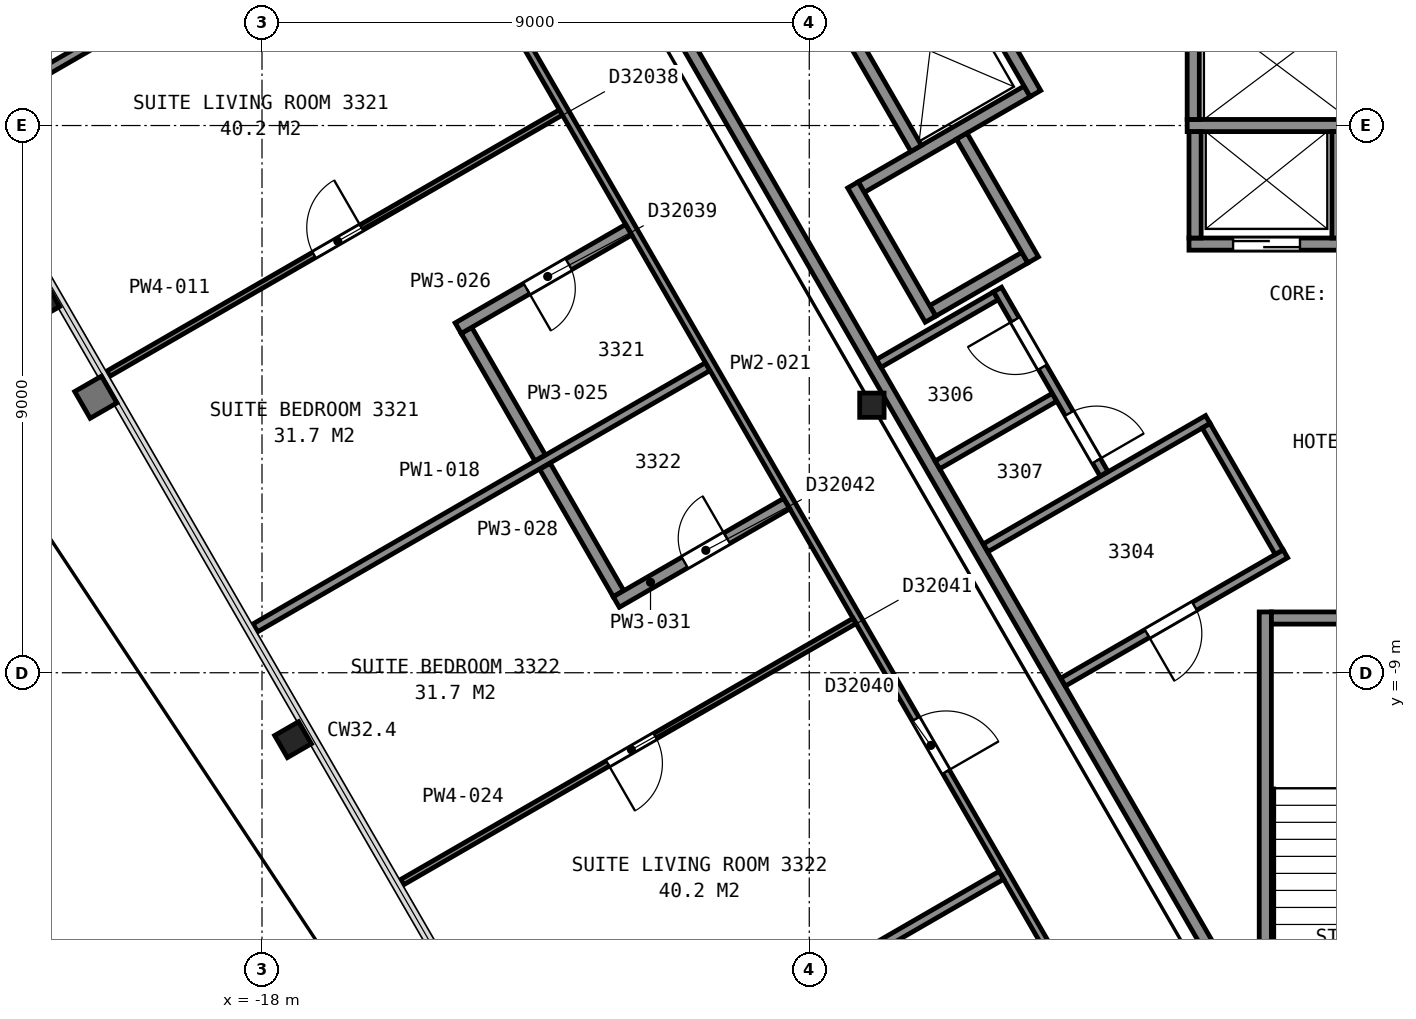
"""IFC4 building model, lengths in metres.
Left out: names, types, materials, properties, quantities, classifications, styles, units other than length and angle.
Written with IfcOpenShell. Run it as: python <this file> out.ifc"""

import sys

from ifc_helpers import new_model, si_unit, direction, frame, frame_2d, origin, origin_2d, place, context, subcontext, project, spatial, rectangle, i_section, extrude, element, fill, save


model = new_model("IFC4")
c1 = context("Model", 3, precision=1e-05, world=origin(), true_north=direction((0.0, 1.0)))
c2 = subcontext(c1, "Body", "Model", "MODEL_VIEW")
j1 = project(units=[si_unit("LENGTHUNIT", "METRE"), si_unit("PLANEANGLEUNIT", "RADIAN")], contexts=[c1])
p1 = place(None, origin())
s1 = spatial("IfcSite", under=j1, at=p1, CompositionType="ELEMENT")
p2 = place(p1, origin())
s2 = spatial("IfcBuilding", under=s1, at=p2, CompositionType="ELEMENT")
p3 = place(p2, frame((0.0, 0.0, 136.0)))
s3 = spatial("IfcBuildingStorey", under=s2, at=p3, CompositionType="ELEMENT", Elevation=136.0)
for number, where, z_axis, x_axis in (
    (1, (-21.63, -2.91, 0.0), (0.0, 0.0, 1.0), (-0.5, 0.866, 0.0)),
    (2, (-17.49, -10.1, 0.0), (0.0, 0.0, 1.0), (-0.5, 0.866, 0.0)),
):
    element("IfcColumn", number, at=place(p3, frame(where, z_axis=z_axis, x_axis=x_axis)), inside=s3, PredefinedType="COLUMN", context=c2, shape_type="SweptSolid", body=[
        extrude(i_section(OverallWidth=0.419, OverallDepth=0.455, WebThickness=0.042, FlangeThickness=0.068, FilletRadius=0.015, at=origin_2d()), origin(), (0.0, 0.0, 1.0), 3.6),
    ])
p4 = place(p3, frame((-7.97, -4.6, 0.0), z_axis=(0.0, 0.0, 1.0), x_axis=(1.0, 0.0, 0.0)))
e3 = element("IfcColumn", 3, at=p4, inside=s3, PredefinedType="COLUMN", context=c2, shape_type="SweptSolid", body=[
    extrude(i_section(OverallWidth=0.401, OverallDepth=0.399, WebThickness=0.025, FlangeThickness=0.04, FilletRadius=0.015, at=origin_2d()), origin(), (0.0, 0.0, 1.0), 3.6),
])
p5 = place(p3, frame((-1.5, -8.0, 0.0), z_axis=(0.0, 0.0, 1.0), x_axis=(0.0, -1.0, 0.0)))
e4 = element("IfcWall", 4, at=p5, inside=s3, PredefinedType="PARTITIONING", context=c2, shape_type="SweptSolid", body=[
    extrude(rectangle(XDim=12.0, YDim=0.2, at=frame_2d((6.0, 0.0))), origin(), (0.0, 0.0, 1.0), 3.35),
])
p6 = place(p3, frame((-1.4, -8.1, 0.0), z_axis=(0.0, 0.0, 1.0), x_axis=(1.0, 0.0, 0.0)))
e5 = element("IfcWall", 5, at=p6, inside=s3, PredefinedType="PARTITIONING", context=c2, shape_type="SweptSolid", body=[
    extrude(rectangle(XDim=2.8, YDim=0.2, at=frame_2d((1.4, 0.0))), origin(), (0.0, 0.0, 1.0), 3.35),
])
p7 = place(p3, frame((-2.755, -1.95, 0.0), z_axis=(0.0, 0.0, 1.0), x_axis=(1.0, 0.0, 0.0)))
e6 = element("IfcWall", 6, at=p7, inside=s3, PredefinedType="PARTITIONING", context=c2, shape_type="SweptSolid", body=[
    extrude(rectangle(XDim=2.55, YDim=0.2, at=frame_2d((1.275, 0.0))), origin(), (0.0, 0.0, 1.0), 3.6),
])
p8 = place(p7, frame((0.725, 0.0, 0.0)))
e7 = element("IfcOpeningElement", 7, at=p8, cuts=e6, PredefinedType="OPENING", context=c2, shape_type="SweptSolid", body=[
    extrude(rectangle(XDim=1.1, YDim=2.1, at=frame_2d((0.55, 1.05))), frame((0.0, 0.11, 0.0), z_axis=(0.0, -1.0, 0.0), x_axis=(1.0, 0.0, 0.0)), (0.0, 0.0, 1.0), 0.22),
])
p9 = place(p3, frame((-2.785, 0.0, 0.0), z_axis=(0.0, 0.0, 1.0), x_axis=(1.0, 0.0, 0.0)))
e8 = element("IfcWall", 8, at=p9, inside=s3, PredefinedType="PARTITIONING", context=c2, shape_type="SweptSolid", body=[
    extrude(rectangle(XDim=2.95, YDim=0.2, at=frame_2d((1.475, 0.0))), origin(), (0.0, 0.0, 1.0), 3.6),
])
p10 = place(p3, frame((-6.97, -3.048, 0.0), z_axis=(0.0, 0.0, 1.0), x_axis=(0.866036909293, 0.499980071345, 0.0)))
e9 = element("IfcWall", 9, at=p10, inside=s3, PredefinedType="PARTITIONING", context=c2, shape_type="SweptSolid", body=[
    extrude(rectangle(XDim=1.75, YDim=0.2, at=frame_2d((0.875, 0.0))), origin(), (0.0, 0.0, 1.0), 3.6),
])
p11 = place(p3, frame((-8.145, -1.013, 0.0), z_axis=(0.0, 0.0, 1.0), x_axis=(0.866016494683, 0.500015430699, 0.0)))
e10 = element("IfcWall", 10, at=p11, inside=s3, PredefinedType="PARTITIONING", context=c2, shape_type="SweptSolid", body=[
    extrude(rectangle(XDim=3.15, YDim=0.2, at=frame_2d((1.575, 0.0))), origin(), (0.0, 0.0, 1.0), 3.6),
])
for number, where, z_axis, x_axis in (
    (11, (-0.305, -1.85, 0.0), (0.0, 0.0, 1.0), (0.0, 1.0, 0.0)),
    (12, (-2.655, -1.85, 0.0), (0.0, 0.0, 1.0), (0.0, 1.0, 0.0)),
):
    element("IfcWall", number, at=place(p3, frame(where, z_axis=z_axis, x_axis=x_axis)), inside=s3, PredefinedType="PARTITIONING", context=c2, shape_type="SweptSolid", body=[
        extrude(rectangle(XDim=1.75, YDim=0.2, at=frame_2d((0.875, 0.0))), origin(), (0.0, 0.0, 1.0), 3.6),
    ])
p12 = place(p3, frame((-2.685, 0.1, 0.0), z_axis=(0.0, 0.0, 1.0), x_axis=(0.0, 1.0, 0.0)))
e13 = element("IfcWall", 13, at=p12, inside=s3, PredefinedType="PARTITIONING", context=c2, shape_type="SweptSolid", body=[
    extrude(rectangle(XDim=1.95, YDim=0.2, at=frame_2d((0.975, 0.0))), origin(), (0.0, 0.0, 1.0), 3.6),
])
p13 = place(p3, frame((-5.28, 0.525, 0.0), z_axis=(0.0, 0.0, 1.0), x_axis=(-0.500037662692, 0.866003658127, 0.0)))
e14 = element("IfcWall", 14, at=p13, inside=s3, PredefinedType="PARTITIONING", context=c2, shape_type="SweptSolid", body=[
    extrude(rectangle(XDim=2.95, YDim=0.2, at=frame_2d((1.475, 0.0))), origin(), (0.0, 0.0, 1.0), 3.6),
])
p14 = place(p13, frame((0.925, 0.0, 0.0)))
e15 = element("IfcOpeningElement", 15, at=p14, cuts=e14, PredefinedType="OPENING", context=c2, shape_type="SweptSolid", body=[
    extrude(rectangle(XDim=1.1, YDim=2.1, at=frame_2d((0.55, 1.05))), frame((0.0, 0.11, 0.0), z_axis=(0.0, -1.0, 0.0), x_axis=(1.0, 0.0, 0.0)), (0.0, 0.0, 1.0), 0.22),
])
p15 = place(p3, frame((-5.318, -2.21, 0.0), z_axis=(0.0, 0.0, 1.0), x_axis=(-0.499938297808, 0.866061024631, 0.0)))
e16 = element("IfcWall", 16, at=p15, inside=s3, PredefinedType="PARTITIONING", context=c2, shape_type="SweptSolid", body=[
    extrude(rectangle(XDim=2.35, YDim=0.2, at=frame_2d((1.175, 0.0))), origin(), (0.0, 0.0, 1.0), 3.6),
])
p16 = place(p3, frame((-7.242, -0.376, 0.0), z_axis=(0.0, 0.0, 1.0), x_axis=(-0.499996545922, 0.866027397988, 0.0)))
e17 = element("IfcWall", 17, at=p16, inside=s3, PredefinedType="PARTITIONING", context=c2, shape_type="SweptSolid", body=[
    extrude(rectangle(XDim=2.75, YDim=0.2, at=frame_2d((1.375, 0.0))), origin(), (0.0, 0.0, 1.0), 3.6),
])
p17 = place(p3, frame((-7.006, -3.185, 0.0), z_axis=(0.0, 0.0, 1.0), x_axis=(-0.499990435942, 0.866030925526, 0.0)))
e18 = element("IfcWall", 18, at=p17, inside=s3, PredefinedType="PARTITIONING", context=c2, shape_type="SweptSolid", body=[
    extrude(rectangle(XDim=2.55, YDim=0.2, at=frame_2d((1.275, 0.0))), origin(), (0.0, 0.0, 1.0), 3.6),
])
p18 = place(p3, frame((-13.664, 5.946, 0.0), z_axis=(0.0, 0.0, 1.0), x_axis=(0.499994327219, -0.866028678941, 0.0)))
e19 = element("IfcWall", 19, at=p18, inside=s3, PredefinedType="PARTITIONING", context=c2, shape_type="SweptSolid", body=[
    extrude(rectangle(XDim=23.968, YDim=0.2, at=frame_2d((11.984, 0.0))), origin(), (0.0, 0.0, 1.0), 3.35),
])
p19 = place(p3, frame((-7.856, -3.912, 0.0), z_axis=(0.0, 0.0, 1.0), x_axis=(0.865971748, 0.500092923031, 0.0)))
e20 = element("IfcWall", 20, at=p19, inside=s3, PredefinedType="PARTITIONING", context=c2, shape_type="SweptSolid", body=[
    extrude(rectangle(XDim=2.225, YDim=0.15, at=frame_2d((1.112, 0.0))), origin(), (0.0, 0.0, 1.0), 3.35),
])
p20 = place(p3, frame((-6.892, -5.582, 0.0), z_axis=(0.0, 0.0, 1.0), x_axis=(0.865944298464, 0.500140452231, 0.0)))
e21 = element("IfcWall", 21, at=p20, inside=s3, PredefinedType="PARTITIONING", context=c2, shape_type="SweptSolid", body=[
    extrude(rectangle(XDim=2.224, YDim=0.15, at=frame_2d((1.112, 0.0))), origin(), (0.0, 0.0, 1.0), 3.35),
])
p21 = place(p3, frame((-6.1, -6.946, 0.0), z_axis=(0.0, 0.0, 1.0), x_axis=(0.866038200431, 0.499977834903, 0.0)))
e22 = element("IfcWall", 22, at=p21, inside=s3, PredefinedType="PARTITIONING", context=c2, shape_type="SweptSolid", body=[
    extrude(rectangle(XDim=4.22, YDim=0.15, at=frame_2d((2.11, 0.0))), origin(), (0.0, 0.0, 1.0), 3.35),
])
p22 = place(p3, frame((-4.152, -5.729, 0.0), z_axis=(0.0, 0.0, 1.0), x_axis=(-0.500024287448, 0.866011380966, 0.0)))
e23 = element("IfcWall", 23, at=p22, inside=s3, PredefinedType="PARTITIONING", context=c2, shape_type="SweptSolid", body=[
    extrude(rectangle(XDim=3.501, YDim=0.15, at=frame_2d((1.75, 0.0))), origin(), (0.0, 0.0, 1.0), 3.35),
])
p23 = place(p22, frame((2.026, 0.0, 0.0)))
e24 = element("IfcOpeningElement", 24, at=p23, cuts=e23, PredefinedType="OPENING", context=c2, shape_type="SweptSolid", body=[
    extrude(rectangle(XDim=0.9, YDim=2.1, at=frame_2d((0.45, 1.05))), frame((0.0, 0.085, 0.0), z_axis=(0.0, -1.0, 0.0), x_axis=(1.0, 0.0, 0.0)), (0.0, 0.0, 1.0), 0.17),
])
p24 = place(p22, frame((0.248, 0.0, 0.0)))
e25 = element("IfcOpeningElement", 25, at=p24, cuts=e23, PredefinedType="OPENING", context=c2, shape_type="SweptSolid", body=[
    extrude(rectangle(XDim=0.9, YDim=2.1, at=frame_2d((0.45, 1.05))), frame((0.0, 0.085, 0.0), z_axis=(0.0, -1.0, 0.0), x_axis=(1.0, 0.0, 0.0)), (0.0, 0.0, 1.0), 0.17),
])
p25 = place(p3, frame((-4.825, -9.154, 0.0), z_axis=(0.0, 0.0, 1.0), x_axis=(0.866023738697, 0.500002884005, 0.0)))
e26 = element("IfcWall", 26, at=p25, inside=s3, PredefinedType="PARTITIONING", context=c2, shape_type="SweptSolid", body=[
    extrude(rectangle(XDim=4.22, YDim=0.15, at=frame_2d((2.11, 0.0))), origin(), (0.0, 0.0, 1.0), 3.35),
])
p26 = place(p25, frame((1.595, 0.0, 0.0)))
e27 = element("IfcOpeningElement", 27, at=p26, cuts=e26, PredefinedType="OPENING", context=c2, shape_type="SweptSolid", body=[
    extrude(rectangle(XDim=0.9, YDim=2.1, at=frame_2d((0.45, 1.05))), frame((0.0, 0.085, 0.0), z_axis=(0.0, -1.0, 0.0), x_axis=(1.0, 0.0, 0.0)), (0.0, 0.0, 1.0), 0.17),
])
p27 = place(p3, frame((-2.472, -4.938, 0.0), z_axis=(0.0, 0.0, 1.0), x_axis=(0.500045362686, -0.865999212041, 0.0)))
e28 = element("IfcWall", 28, at=p27, inside=s3, PredefinedType="PARTITIONING", context=c2, shape_type="SweptSolid", body=[
    extrude(rectangle(XDim=2.4, YDim=0.15, at=frame_2d((1.2, 0.0))), origin(), (0.0, 0.0, 1.0), 3.35),
])
p28 = place(p3, frame((-22.939, 0.102, 0.0), z_axis=(0.0, 0.0, 1.0), x_axis=(0.866041729639, 0.499971721724, 0.0)))
e29 = element("IfcWall", 29, at=p28, inside=s3, PredefinedType="PARTITIONING", context=c2, shape_type="SweptSolid", body=[
    extrude(rectangle(XDim=8.591, YDim=0.15, at=frame_2d((4.296, 0.0))), origin(), (0.0, 0.0, 1.0), 2.613),
])
p29 = place(p3, frame((-13.084, 0.216, 0.0), z_axis=(0.0, 0.0, 1.0), x_axis=(-0.866017120224, -0.500014347272, 0.0)))
e30 = element("IfcWall", 30, at=p29, inside=s3, PredefinedType="PARTITIONING", context=c2, shape_type="SweptSolid", body=[
    extrude(rectangle(XDim=8.592, YDim=0.1, at=frame_2d((4.296, 0.0))), origin(), (0.0, 0.0, 1.0), 2.613),
])
p30 = place(p29, frame((3.788, 0.0, 0.0)))
e31 = element("IfcOpeningElement", 31, at=p30, cuts=e30, PredefinedType="OPENING", context=c2, shape_type="SweptSolid", body=[
    extrude(rectangle(XDim=0.9, YDim=2.1, at=frame_2d((0.45, 1.05))), frame((0.0, 0.06, 0.0), z_axis=(0.0, -1.0, 0.0), x_axis=(1.0, 0.0, 0.0)), (0.0, 0.0, 1.0), 0.12),
])
p31 = place(p3, frame((-18.11, -8.262, 0.0), z_axis=(0.0, 0.0, 1.0), x_axis=(0.866034625887, 0.499984026509, 0.0)))
e32 = element("IfcWall", 32, at=p31, inside=s3, PredefinedType="PARTITIONING", context=c2, shape_type="SweptSolid", body=[
    extrude(rectangle(XDim=8.591, YDim=0.15, at=frame_2d((4.295, 0.0))), origin(), (0.0, 0.0, 1.0), 2.613),
])
p32 = place(p3, frame((-3.756, -15.816, 0.0), z_axis=(0.0, 0.0, 1.0), x_axis=(-0.499992829944, 0.866029543379, 0.0)))
e33 = element("IfcWall", 33, at=p32, inside=s3, PredefinedType="PARTITIONING", context=c2, shape_type="SweptSolid", body=[
    extrude(rectangle(XDim=24.413, YDim=0.125, at=frame_2d((12.207, 0.0))), origin(), (0.0, 0.0, 1.0), 2.613),
])
p33 = place(p32, frame((20.478, 0.0, 0.0)))
e34 = element("IfcOpeningElement", 34, at=p33, cuts=e33, PredefinedType="OPENING", context=c2, shape_type="SweptSolid", body=[
    extrude(rectangle(XDim=1.0, YDim=2.1, at=frame_2d((0.5, 1.05))), frame((0.0, 0.073, 0.0), z_axis=(0.0, -1.0, 0.0), x_axis=(1.0, 0.0, 0.0)), (0.0, 0.0, 1.0), 0.145),
])
p34 = place(p32, frame((5.99, 0.0, 0.0)))
e35 = element("IfcOpeningElement", 35, at=p34, cuts=e33, PredefinedType="OPENING", context=c2, shape_type="SweptSolid", body=[
    extrude(rectangle(XDim=1.0, YDim=2.1, at=frame_2d((0.5, 1.05))), frame((0.0, 0.073, 0.0), z_axis=(0.0, -1.0, 0.0), x_axis=(1.0, 0.0, 0.0)), (0.0, 0.0, 1.0), 0.145),
])
p35 = place(p32, frame((1.561, 0.0, 0.0)))
e36 = element("IfcOpeningElement", 36, at=p35, cuts=e33, PredefinedType="OPENING", context=c2, shape_type="SweptSolid", body=[
    extrude(rectangle(XDim=1.0, YDim=2.1, at=frame_2d((0.5, 1.05))), frame((0.0, 0.073, 0.0), z_axis=(0.0, -1.0, 0.0), x_axis=(1.0, 0.0, 0.0)), (0.0, 0.0, 1.0), 0.145),
])
p36 = place(p3, frame((-15.696, -12.444, 0.0), z_axis=(0.0, 0.0, 1.0), x_axis=(0.866024224461, 0.500002042643, 0.0)))
e37 = element("IfcWall", 37, at=p36, inside=s3, PredefinedType="PARTITIONING", context=c2, shape_type="SweptSolid", body=[
    extrude(rectangle(XDim=8.592, YDim=0.1, at=frame_2d((4.296, 0.0))), origin(), (0.0, 0.0, 1.0), 2.613),
])
p37 = place(p36, frame((3.904, 0.0, 0.0)))
e38 = element("IfcOpeningElement", 38, at=p37, cuts=e37, PredefinedType="OPENING", context=c2, shape_type="SweptSolid", body=[
    extrude(rectangle(XDim=0.9, YDim=2.1, at=frame_2d((0.45, 1.05))), frame((0.0, 0.06, 0.0), z_axis=(0.0, -1.0, 0.0), x_axis=(1.0, 0.0, 0.0)), (0.0, 0.0, 1.0), 0.12),
])
p38 = place(p3, frame((-14.637, -3.37, 0.0), z_axis=(0.0, 0.0, 1.0), x_axis=(0.50002218001, -0.866012597771, 0.0)))
e39 = element("IfcWall", 39, at=p38, inside=s3, PredefinedType="PARTITIONING", context=c2, shape_type="SweptSolid", body=[
    extrude(rectangle(XDim=2.421, YDim=0.2, at=frame_2d((1.21, 0.0))), origin(), (0.0, 0.0, 1.0), 2.613),
])
p39 = place(p3, frame((-11.97, -1.714, 0.0), z_axis=(0.0, 0.0, 1.0), x_axis=(-0.866016035791, -0.500016225489, 0.0)))
e40 = element("IfcWall", 40, at=p39, inside=s3, PredefinedType="PARTITIONING", context=c2, shape_type="SweptSolid", body=[
    extrude(rectangle(XDim=3.237, YDim=0.2, at=frame_2d((1.619, 0.0))), origin(), (0.0, 0.0, 1.0), 2.613),
])
p40 = place(p39, frame((1.137, 0.0, 0.0)))
e41 = element("IfcOpeningElement", 41, at=p40, cuts=e40, PredefinedType="OPENING", context=c2, shape_type="SweptSolid", body=[
    extrude(rectangle(XDim=0.8, YDim=2.1, at=frame_2d((0.4, 1.05))), frame((0.0, 0.11, 0.0), z_axis=(0.0, -1.0, 0.0), x_axis=(1.0, 0.0, 0.0)), (0.0, 0.0, 1.0), 0.22),
])
p41 = place(p3, frame((-13.346, -5.604, 0.0), z_axis=(0.0, 0.0, 1.0), x_axis=(0.499719542643, -0.866187265377, 0.0)))
e42 = element("IfcWall", 42, at=p41, inside=s3, PredefinedType="PARTITIONING", context=c2, shape_type="SweptSolid", body=[
    extrude(rectangle(XDim=2.42, YDim=0.2, at=frame_2d((1.21, 0.0))), origin(), (0.0, 0.0, 1.0), 2.613),
])
p42 = place(p3, frame((-13.281, -16.627, 0.0), z_axis=(0.0, 0.0, 1.0), x_axis=(0.866036528751, 0.499980730498, 0.0)))
e43 = element("IfcWall", 43, at=p42, inside=s3, PredefinedType="PARTITIONING", context=c2, shape_type="SweptSolid", body=[
    extrude(rectangle(XDim=8.592, YDim=0.15, at=frame_2d((4.296, 0.0))), origin(), (0.0, 0.0, 1.0), 2.613),
])
p43 = place(p3, frame((-12.174, -7.837, 0.0), z_axis=(0.0, 0.0, 1.0), x_axis=(0.866016035791, 0.500016225489, 0.0)))
e44 = element("IfcWall", 44, at=p43, inside=s3, PredefinedType="PARTITIONING", context=c2, shape_type="SweptSolid", body=[
    extrude(rectangle(XDim=3.237, YDim=0.2, at=frame_2d((1.619, 0.0))), origin(), (0.0, 0.0, 1.0), 2.613),
])
p44 = place(p43, frame((1.3, 0.0, 0.0)))
e45 = element("IfcOpeningElement", 45, at=p44, cuts=e44, PredefinedType="OPENING", context=c2, shape_type="SweptSolid", body=[
    extrude(rectangle(XDim=0.8, YDim=2.1, at=frame_2d((0.4, 1.05))), frame((0.0, 0.11, 0.0), z_axis=(0.0, -1.0, 0.0), x_axis=(1.0, 0.0, 0.0)), (0.0, 0.0, 1.0), 0.22),
])
p45 = place(p8, origin())
e46 = element("IfcDoor", 46, at=p45, inside=s3, OperationType="SLIDING_TO_RIGHT", PredefinedType="DOOR", context=c2, shape_type="SweptSolid", body=[
    extrude(rectangle(XDim=1.1, YDim=2.1, at=frame_2d((0.55, 1.05))), frame((0.0, 0.025, 0.0), z_axis=(0.0, -1.0, 0.0), x_axis=(1.0, 0.0, 0.0)), (0.0, 0.0, 1.0), 0.05),
])
fill(e7, e46)
p46 = place(p23, origin())
e47 = element("IfcDoor", 47, at=p46, inside=s3, OperationType="SINGLE_SWING_RIGHT", PredefinedType="DOOR", context=c2, shape_type="SweptSolid", body=[
    extrude(rectangle(XDim=0.9, YDim=2.1, at=frame_2d((0.45, 1.05))), frame((0.0, 0.025, 0.0), z_axis=(0.0, -1.0, 0.0), x_axis=(1.0, 0.0, 0.0)), (0.0, 0.0, 1.0), 0.05),
])
fill(e24, e47)
p47 = place(p24, origin())
e48 = element("IfcDoor", 48, at=p47, inside=s3, OperationType="SINGLE_SWING_LEFT", PredefinedType="DOOR", context=c2, shape_type="SweptSolid", body=[
    extrude(rectangle(XDim=0.9, YDim=2.1, at=frame_2d((0.45, 1.05))), frame((0.0, 0.025, 0.0), z_axis=(0.0, -1.0, 0.0), x_axis=(1.0, 0.0, 0.0)), (0.0, 0.0, 1.0), 0.05),
])
fill(e25, e48)
p48 = place(p26, origin())
e49 = element("IfcDoor", 49, at=p48, inside=s3, OperationType="SINGLE_SWING_LEFT", PredefinedType="DOOR", context=c2, shape_type="SweptSolid", body=[
    extrude(rectangle(XDim=0.9, YDim=2.1, at=frame_2d((0.45, 1.05))), frame((0.0, 0.025, 0.0), z_axis=(0.0, -1.0, 0.0), x_axis=(1.0, 0.0, 0.0)), (0.0, 0.0, 1.0), 0.05),
])
fill(e27, e49)
p49 = place(p30, origin())
e50 = element("IfcDoor", 50, at=p49, inside=s3, OperationType="SINGLE_SWING_LEFT", PredefinedType="DOOR", context=c2, shape_type="SweptSolid", body=[
    extrude(rectangle(XDim=0.9, YDim=2.1, at=frame_2d((0.45, 1.05))), frame((0.0, 0.025, 0.0), z_axis=(0.0, -1.0, 0.0), x_axis=(1.0, 0.0, 0.0)), (0.0, 0.0, 1.0), 0.05),
])
fill(e31, e50)
p50 = place(p34, origin())
e51 = element("IfcDoor", 51, at=p50, inside=s3, OperationType="SINGLE_SWING_LEFT", PredefinedType="DOOR", context=c2, shape_type="SweptSolid", body=[
    extrude(rectangle(XDim=1.0, YDim=2.1, at=frame_2d((0.5, 1.05))), frame((0.0, 0.025, 0.0), z_axis=(0.0, -1.0, 0.0), x_axis=(1.0, 0.0, 0.0)), (0.0, 0.0, 1.0), 0.05),
])
fill(e35, e51)
p51 = place(p37, origin())
e52 = element("IfcDoor", 52, at=p51, inside=s3, OperationType="SINGLE_SWING_LEFT", PredefinedType="DOOR", context=c2, shape_type="SweptSolid", body=[
    extrude(rectangle(XDim=0.9, YDim=2.1, at=frame_2d((0.45, 1.05))), frame((0.0, 0.025, 0.0), z_axis=(0.0, -1.0, 0.0), x_axis=(1.0, 0.0, 0.0)), (0.0, 0.0, 1.0), 0.05),
])
fill(e38, e52)
p52 = place(p40, origin())
e53 = element("IfcDoor", 53, at=p52, inside=s3, OperationType="SINGLE_SWING_RIGHT", PredefinedType="DOOR", context=c2, shape_type="SweptSolid", body=[
    extrude(rectangle(XDim=0.8, YDim=2.1, at=frame_2d((0.4, 1.05))), frame((0.0, 0.025, 0.0), z_axis=(0.0, -1.0, 0.0), x_axis=(1.0, 0.0, 0.0)), (0.0, 0.0, 1.0), 0.05),
])
fill(e41, e53)
p53 = place(p44, origin())
e54 = element("IfcDoor", 54, at=p53, inside=s3, OperationType="SINGLE_SWING_RIGHT", PredefinedType="DOOR", context=c2, shape_type="SweptSolid", body=[
    extrude(rectangle(XDim=0.8, YDim=2.1, at=frame_2d((0.4, 1.05))), frame((0.0, 0.025, 0.0), z_axis=(0.0, -1.0, 0.0), x_axis=(1.0, 0.0, 0.0)), (0.0, 0.0, 1.0), 0.05),
])
fill(e45, e54)
save(model, sys.argv[1])
